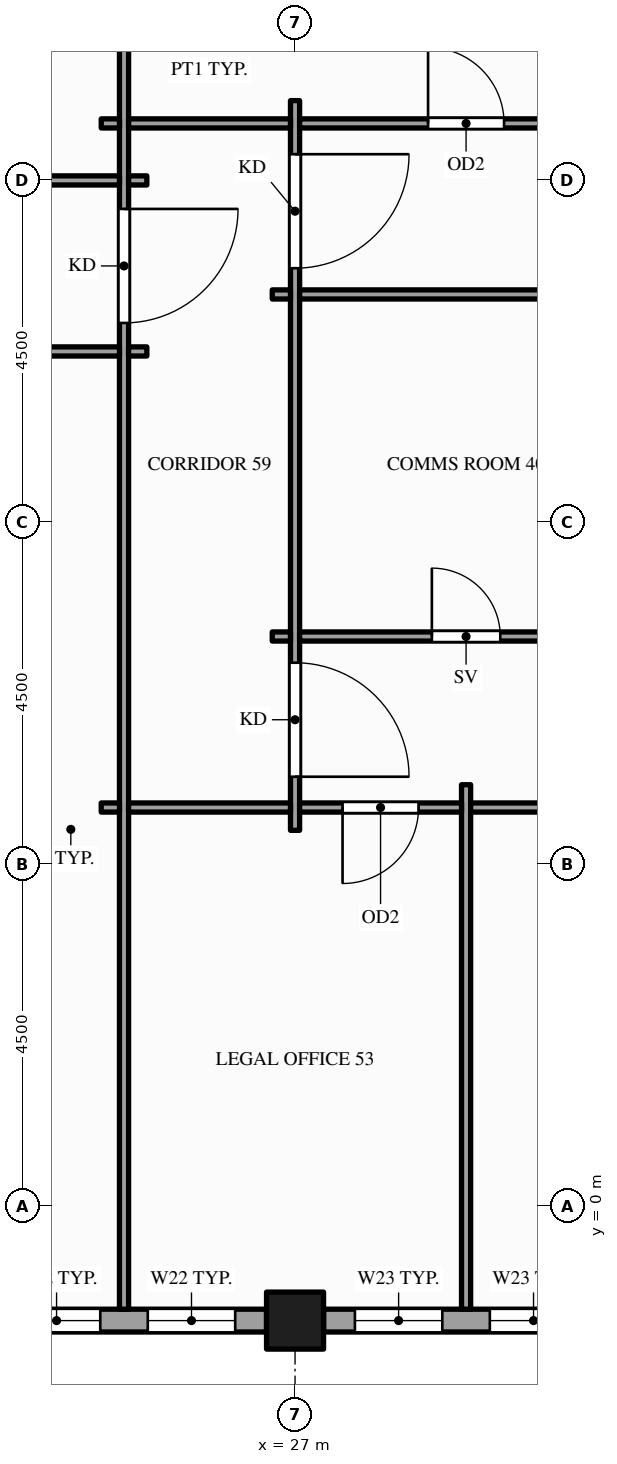
"""IFC4 building model, lengths in metres.
Left out: names, types, materials, properties, quantities, classifications, styles, units other than length and angle.
Written with IfcOpenShell. Run it as: python <this file> out.ifc"""

import sys

from ifc_helpers import new_model, si_unit, direction, frame, frame_2d, origin, origin_2d, place, context, subcontext, project, spatial, rectangle, hollow_rectangle, extrude, element, fill, save


model = new_model("IFC4")
c1 = context("Model", 3, precision=1e-05, world=origin(), true_north=direction((0.0, 1.0)))
c2 = subcontext(c1, "Body", "Model", "MODEL_VIEW")
j1 = project(units=[si_unit("LENGTHUNIT", "METRE"), si_unit("PLANEANGLEUNIT", "RADIAN")], contexts=[c1])
p1 = place(None, origin())
s1 = spatial("IfcSite", under=j1, at=p1, CompositionType="ELEMENT")
p2 = place(p1, origin())
s2 = spatial("IfcBuilding", under=s1, at=p2, CompositionType="ELEMENT")
p3 = place(p2, frame((0.0, 0.0, 235.0)))
s3 = spatial("IfcBuildingStorey", under=s2, at=p3, CompositionType="ELEMENT", Elevation=235.0)
p4 = place(p3, frame((27.0, -1.5, -0.15), z_axis=(0.0, 0.0, 1.0), x_axis=(1.0, 0.0, 0.0)))
e1 = element("IfcColumn", 1, at=p4, inside=s3, PredefinedType="COLUMN", context=c2, shape_type="SweptSolid", body=[
    extrude(hollow_rectangle(XDim=0.75, YDim=0.75, WallThickness=0.036, at=origin_2d()), origin(), (0.0, 0.0, 1.0), 4.0),
])
p5 = place(p3, frame((22.875, -1.5, 0.0), z_axis=(0.0, 0.0, 1.0), x_axis=(1.0, 0.0, 0.0)))
e2 = element("IfcWall", 2, at=p5, inside=s3, PredefinedType="STANDARD", context=c2, shape_type="SweptSolid", body=[
    extrude(rectangle(XDim=3.75, YDim=0.3, at=frame_2d((1.875, 0.0))), origin(), (0.0, 0.0, 1.0), 2.76),
])
p6 = place(p5, frame((0.413, 0.0, 0.9)))
e3 = element("IfcOpeningElement", 3, at=p6, cuts=e2, PredefinedType="OPENING", context=c2, shape_type="SweptSolid", body=[
    extrude(rectangle(XDim=1.15, YDim=1.5, at=frame_2d((0.575, 0.75))), frame((0.0, 0.16, 0.0), z_axis=(0.0, -1.0, 0.0), x_axis=(1.0, 0.0, 0.0)), (0.0, 0.0, 1.0), 0.32),
])
p7 = place(p5, frame((2.188, 0.0, 0.9)))
e4 = element("IfcOpeningElement", 4, at=p7, cuts=e2, PredefinedType="OPENING", context=c2, shape_type="SweptSolid", body=[
    extrude(rectangle(XDim=1.15, YDim=1.5, at=frame_2d((0.575, 0.75))), frame((0.0, 0.16, 0.0), z_axis=(0.0, -1.0, 0.0), x_axis=(1.0, 0.0, 0.0)), (0.0, 0.0, 1.0), 0.32),
])
p8 = place(p3, frame((27.375, -1.5, 0.0), z_axis=(0.0, 0.0, 1.0), x_axis=(1.0, 0.0, 0.0)))
e5 = element("IfcWall", 5, at=p8, inside=s3, PredefinedType="STANDARD", context=c2, shape_type="SweptSolid", body=[
    extrude(rectangle(XDim=3.75, YDim=0.3, at=frame_2d((1.875, 0.0))), origin(), (0.0, 0.0, 1.0), 2.87),
])
p9 = place(p8, frame((0.413, 0.0, 0.9)))
e6 = element("IfcOpeningElement", 6, at=p9, cuts=e5, PredefinedType="OPENING", context=c2, shape_type="SweptSolid", body=[
    extrude(rectangle(XDim=1.15, YDim=1.75, at=frame_2d((0.575, 0.875))), frame((0.0, 0.16, 0.0), z_axis=(0.0, -1.0, 0.0), x_axis=(1.0, 0.0, 0.0)), (0.0, 0.0, 1.0), 0.32),
])
p10 = place(p8, frame((2.188, 0.0, 0.9)))
e7 = element("IfcOpeningElement", 7, at=p10, cuts=e5, PredefinedType="OPENING", context=c2, shape_type="SweptSolid", body=[
    extrude(rectangle(XDim=1.15, YDim=1.75, at=frame_2d((0.575, 0.875))), frame((0.0, 0.16, 0.0), z_axis=(0.0, -1.0, 0.0), x_axis=(1.0, 0.0, 0.0)), (0.0, 0.0, 1.0), 0.32),
])
p11 = place(p3, frame((24.75, -1.35, 0.0), z_axis=(0.0, 0.0, 1.0), x_axis=(0.0, 1.0, 0.0)))
e8 = element("IfcWall", 8, at=p11, inside=s3, PredefinedType="PARTITIONING", context=c2, shape_type="SweptSolid", body=[
    extrude(rectangle(XDim=24.101, YDim=0.12, at=frame_2d((12.05, 0.0))), origin(), (0.0, 0.0, 1.0), 2.76),
])
p12 = place(p11, frame((12.975, 0.0, 0.0)))
e9 = element("IfcOpeningElement", 9, at=p12, cuts=e8, PredefinedType="OPENING", context=c2, shape_type="SweptSolid", body=[
    extrude(rectangle(XDim=1.5, YDim=2.1, at=frame_2d((0.75, 1.05))), frame((0.0, 0.07, 0.0), z_axis=(0.0, -1.0, 0.0), x_axis=(1.0, 0.0, 0.0)), (0.0, 0.0, 1.0), 0.14),
])
p13 = place(p3, frame((27.0, 4.95, 0.0), z_axis=(0.0, 0.0, 1.0), x_axis=(0.0, 1.0, 0.0)))
e10 = element("IfcWall", 10, at=p13, inside=s3, PredefinedType="PARTITIONING", context=c2, shape_type="SweptSolid", body=[
    extrude(rectangle(XDim=9.6, YDim=0.12, at=frame_2d((4.8, 0.0))), origin(), (0.0, 0.0, 1.0), 2.87),
])
p14 = place(p13, frame((0.705, 0.0, 0.0)))
e11 = element("IfcOpeningElement", 11, at=p14, cuts=e10, PredefinedType="OPENING", context=c2, shape_type="SweptSolid", body=[
    extrude(rectangle(XDim=1.5, YDim=2.1, at=frame_2d((0.75, 1.05))), frame((0.0, 0.07, 0.0), z_axis=(0.0, -1.0, 0.0), x_axis=(1.0, 0.0, 0.0)), (0.0, 0.0, 1.0), 0.14),
])
p15 = place(p13, frame((7.395, 0.0, 0.0)))
e12 = element("IfcOpeningElement", 12, at=p15, cuts=e10, PredefinedType="OPENING", context=c2, shape_type="SweptSolid", body=[
    extrude(rectangle(XDim=1.5, YDim=2.1, at=frame_2d((0.75, 1.05))), frame((0.0, 0.07, 0.0), z_axis=(0.0, -1.0, 0.0), x_axis=(1.0, 0.0, 0.0)), (0.0, 0.0, 1.0), 0.14),
])
p16 = place(p3, frame((29.25, -1.35, 0.0), z_axis=(0.0, 0.0, 1.0), x_axis=(0.0, 1.0, 0.0)))
e13 = element("IfcWall", 13, at=p16, inside=s3, PredefinedType="PARTITIONING", context=c2, shape_type="SweptSolid", body=[
    extrude(rectangle(XDim=6.9, YDim=0.12, at=frame_2d((3.45, 0.0))), origin(), (0.0, 0.0, 1.0), 2.87),
])
p17 = place(p3, frame((24.45, 5.25, 0.0), z_axis=(0.0, 0.0, 1.0), x_axis=(1.0, 0.0, 0.0)))
e14 = element("IfcWall", 14, at=p17, inside=s3, PredefinedType="PARTITIONING", context=c2, shape_type="SweptSolid", body=[
    extrude(rectangle(XDim=0.24, YDim=0.12, at=frame_2d((0.12, 0.0))), origin(), (0.0, 0.0, 1.0), 2.76),
])
p18 = place(p3, frame((24.81, 5.25, 0.0), z_axis=(0.0, 0.0, 1.0), x_axis=(1.0, 0.0, 0.0)))
e15 = element("IfcWall", 15, at=p18, inside=s3, PredefinedType="PARTITIONING", context=c2, shape_type="SweptSolid", body=[
    extrude(rectangle(XDim=2.13, YDim=0.12, at=frame_2d((1.065, 0.0))), origin(), (0.0, 0.0, 1.0), 2.76),
])
p19 = place(p3, frame((27.06, 5.25, 0.0), z_axis=(0.0, 0.0, 1.0), x_axis=(1.0, 0.0, 0.0)))
e16 = element("IfcWall", 16, at=p19, inside=s3, PredefinedType="PARTITIONING", context=c2, shape_type="SweptSolid", body=[
    extrude(rectangle(XDim=2.13, YDim=0.12, at=frame_2d((1.065, 0.0))), origin(), (0.0, 0.0, 1.0), 2.87),
])
p20 = place(p19, frame((0.565, 0.0, 0.0)))
e17 = element("IfcOpeningElement", 17, at=p20, cuts=e16, PredefinedType="OPENING", context=c2, shape_type="SweptSolid", body=[
    extrude(rectangle(XDim=1.0, YDim=2.1, at=frame_2d((0.5, 1.05))), frame((0.0, 0.07, 0.0), z_axis=(0.0, -1.0, 0.0), x_axis=(1.0, 0.0, 0.0)), (0.0, 0.0, 1.0), 0.14),
])
p21 = place(p3, frame((29.31, 5.25, 0.0), z_axis=(0.0, 0.0, 1.0), x_axis=(1.0, 0.0, 0.0)))
e18 = element("IfcWall", 18, at=p21, inside=s3, PredefinedType="PARTITIONING", context=c2, shape_type="SweptSolid", body=[
    extrude(rectangle(XDim=11.13, YDim=0.12, at=frame_2d((5.565, 0.0))), origin(), (0.0, 0.0, 1.0), 2.87),
])
p22 = place(p21, frame((4.665, 0.0, 0.0)))
e19 = element("IfcOpeningElement", 19, at=p22, cuts=e18, PredefinedType="OPENING", context=c2, shape_type="SweptSolid", body=[
    extrude(rectangle(XDim=1.8, YDim=2.1, at=frame_2d((0.9, 1.05))), frame((0.0, 0.07, 0.0), z_axis=(0.0, -1.0, 0.0), x_axis=(1.0, 0.0, 0.0)), (0.0, 0.0, 1.0), 0.14),
])
p23 = place(p3, frame((26.7, 7.5, 0.0), z_axis=(0.0, 0.0, 1.0), x_axis=(1.0, 0.0, 0.0)))
e20 = element("IfcWall", 20, at=p23, inside=s3, PredefinedType="PARTITIONING", context=c2, shape_type="SweptSolid", body=[
    extrude(rectangle(XDim=0.24, YDim=0.12, at=frame_2d((0.12, 0.0))), origin(), (0.0, 0.0, 1.0), 2.87),
])
p24 = place(p3, frame((27.06, 7.5, 0.0), z_axis=(0.0, 0.0, 1.0), x_axis=(1.0, 0.0, 0.0)))
e21 = element("IfcWall", 21, at=p24, inside=s3, PredefinedType="PARTITIONING", context=c2, shape_type="SweptSolid", body=[
    extrude(rectangle(XDim=4.38, YDim=0.12, at=frame_2d((2.19, 0.0))), origin(), (0.0, 0.0, 1.0), 2.87),
])
p25 = place(p24, frame((1.74, 0.0, 0.0)))
e22 = element("IfcOpeningElement", 22, at=p25, cuts=e21, PredefinedType="OPENING", context=c2, shape_type="SweptSolid", body=[
    extrude(rectangle(XDim=0.9, YDim=2.1, at=frame_2d((0.45, 1.05))), frame((0.0, 0.07, 0.0), z_axis=(0.0, -1.0, 0.0), x_axis=(1.0, 0.0, 0.0)), (0.0, 0.0, 1.0), 0.14),
])
p26 = place(p3, frame((20.31, 11.25, 0.0), z_axis=(0.0, 0.0, 1.0), x_axis=(1.0, 0.0, 0.0)))
e23 = element("IfcWall", 23, at=p26, inside=s3, PredefinedType="PARTITIONING", context=c2, shape_type="SweptSolid", body=[
    extrude(rectangle(XDim=4.38, YDim=0.12, at=frame_2d((2.19, 0.0))), origin(), (0.0, 0.0, 1.0), 2.76),
])
p27 = place(p26, frame((1.69, 0.0, 0.0)))
e24 = element("IfcOpeningElement", 24, at=p27, cuts=e23, PredefinedType="OPENING", context=c2, shape_type="SweptSolid", body=[
    extrude(rectangle(XDim=1.0, YDim=2.1, at=frame_2d((0.5, 1.05))), frame((0.0, 0.07, 0.0), z_axis=(0.0, -1.0, 0.0), x_axis=(1.0, 0.0, 0.0)), (0.0, 0.0, 1.0), 0.14),
])
p28 = place(p3, frame((24.81, 11.25, 0.0), z_axis=(0.0, 0.0, 1.0), x_axis=(1.0, 0.0, 0.0)))
e25 = element("IfcWall", 25, at=p28, inside=s3, PredefinedType="PARTITIONING", context=c2, shape_type="SweptSolid", body=[
    extrude(rectangle(XDim=0.24, YDim=0.12, at=frame_2d((0.12, 0.0))), origin(), (0.0, 0.0, 1.0), 2.76),
])
p29 = place(p3, frame((26.7, 12.0, 0.0), z_axis=(0.0, 0.0, 1.0), x_axis=(1.0, 0.0, 0.0)))
e26 = element("IfcWall", 26, at=p29, inside=s3, PredefinedType="PARTITIONING", context=c2, shape_type="SweptSolid", body=[
    extrude(rectangle(XDim=0.24, YDim=0.12, at=frame_2d((0.12, 0.0))), origin(), (0.0, 0.0, 1.0), 2.87),
])
p30 = place(p3, frame((27.06, 12.0, 0.0), z_axis=(0.0, 0.0, 1.0), x_axis=(1.0, 0.0, 0.0)))
e27 = element("IfcWall", 27, at=p30, inside=s3, PredefinedType="PARTITIONING", context=c2, shape_type="SweptSolid", body=[
    extrude(rectangle(XDim=4.38, YDim=0.12, at=frame_2d((2.19, 0.0))), origin(), (0.0, 0.0, 1.0), 2.87),
])
p31 = place(p3, frame((11.31, 13.5, 0.0), z_axis=(0.0, 0.0, 1.0), x_axis=(1.0, 0.0, 0.0)))
e28 = element("IfcWall", 28, at=p31, inside=s3, PredefinedType="PARTITIONING", context=c2, shape_type="SweptSolid", body=[
    extrude(rectangle(XDim=13.38, YDim=0.12, at=frame_2d((6.69, 0.0))), origin(), (0.0, 0.0, 1.0), 2.76),
])
p32 = place(p31, frame((3.54, 0.0, 0.0)))
e29 = element("IfcOpeningElement", 29, at=p32, cuts=e28, PredefinedType="OPENING", context=c2, shape_type="SweptSolid", body=[
    extrude(rectangle(XDim=1.8, YDim=2.1, at=frame_2d((0.9, 1.05))), frame((0.0, 0.07, 0.0), z_axis=(0.0, -1.0, 0.0), x_axis=(1.0, 0.0, 0.0)), (0.0, 0.0, 1.0), 0.14),
])
for number, where, z_axis, x_axis in (
    (30, (24.81, 13.5, 0.0), (0.0, 0.0, 1.0), (1.0, 0.0, 0.0)),
    (31, (24.45, 14.25, 0.0), (0.0, 0.0, 1.0), (1.0, 0.0, 0.0)),
):
    element("IfcWall", number, at=place(p3, frame(where, z_axis=z_axis, x_axis=x_axis)), inside=s3, PredefinedType="PARTITIONING", context=c2, shape_type="SweptSolid", body=[
        extrude(rectangle(XDim=0.24, YDim=0.12, at=frame_2d((0.12, 0.0))), origin(), (0.0, 0.0, 1.0), 2.76),
    ])
p33 = place(p3, frame((24.81, 14.25, 0.0), z_axis=(0.0, 0.0, 1.0), x_axis=(1.0, 0.0, 0.0)))
e32 = element("IfcWall", 32, at=p33, inside=s3, PredefinedType="PARTITIONING", context=c2, shape_type="SweptSolid", body=[
    extrude(rectangle(XDim=2.13, YDim=0.12, at=frame_2d((1.065, 0.0))), origin(), (0.0, 0.0, 1.0), 2.76),
])
p34 = place(p3, frame((27.06, 14.25, 0.0), z_axis=(0.0, 0.0, 1.0), x_axis=(1.0, 0.0, 0.0)))
e33 = element("IfcWall", 33, at=p34, inside=s3, PredefinedType="PARTITIONING", context=c2, shape_type="SweptSolid", body=[
    extrude(rectangle(XDim=4.38, YDim=0.12, at=frame_2d((2.19, 0.0))), origin(), (0.0, 0.0, 1.0), 2.87),
])
p35 = place(p34, frame((1.69, 0.0, 0.0)))
e34 = element("IfcOpeningElement", 34, at=p35, cuts=e33, PredefinedType="OPENING", context=c2, shape_type="SweptSolid", body=[
    extrude(rectangle(XDim=1.0, YDim=2.1, at=frame_2d((0.5, 1.05))), frame((0.0, 0.07, 0.0), z_axis=(0.0, -1.0, 0.0), x_axis=(1.0, 0.0, 0.0)), (0.0, 0.0, 1.0), 0.14),
])
p36 = place(p6, origin())
e35 = element("IfcWindow", 35, at=p36, inside=s3, PartitioningType="SINGLE_PANEL", PredefinedType="WINDOW", context=c2, shape_type="SweptSolid", body=[
    extrude(rectangle(XDim=1.15, YDim=1.5, at=frame_2d((0.575, 0.75))), frame((0.0, 0.03, 0.0), z_axis=(0.0, -1.0, 0.0), x_axis=(1.0, 0.0, 0.0)), (0.0, 0.0, 1.0), 0.06),
])
fill(e3, e35)
p37 = place(p7, origin())
e36 = element("IfcWindow", 36, at=p37, inside=s3, PartitioningType="SINGLE_PANEL", PredefinedType="WINDOW", context=c2, shape_type="SweptSolid", body=[
    extrude(rectangle(XDim=1.15, YDim=1.5, at=frame_2d((0.575, 0.75))), frame((0.0, 0.03, 0.0), z_axis=(0.0, -1.0, 0.0), x_axis=(1.0, 0.0, 0.0)), (0.0, 0.0, 1.0), 0.06),
])
fill(e4, e36)
p38 = place(p9, origin())
e37 = element("IfcWindow", 37, at=p38, inside=s3, PartitioningType="SINGLE_PANEL", PredefinedType="WINDOW", context=c2, shape_type="SweptSolid", body=[
    extrude(rectangle(XDim=1.15, YDim=1.75, at=frame_2d((0.575, 0.875))), frame((0.0, 0.03, 0.0), z_axis=(0.0, -1.0, 0.0), x_axis=(1.0, 0.0, 0.0)), (0.0, 0.0, 1.0), 0.06),
])
fill(e6, e37)
p39 = place(p10, origin())
e38 = element("IfcWindow", 38, at=p39, inside=s3, PartitioningType="SINGLE_PANEL", PredefinedType="WINDOW", context=c2, shape_type="SweptSolid", body=[
    extrude(rectangle(XDim=1.15, YDim=1.75, at=frame_2d((0.575, 0.875))), frame((0.0, 0.03, 0.0), z_axis=(0.0, -1.0, 0.0), x_axis=(1.0, 0.0, 0.0)), (0.0, 0.0, 1.0), 0.06),
])
fill(e7, e38)
p40 = place(p12, origin())
e39 = element("IfcDoor", 39, at=p40, inside=s3, OperationType="SINGLE_SWING_RIGHT", PredefinedType="DOOR", context=c2, shape_type="SweptSolid", body=[
    extrude(rectangle(XDim=1.5, YDim=2.1, at=frame_2d((0.75, 1.05))), frame((0.0, 0.025, 0.0), z_axis=(0.0, -1.0, 0.0), x_axis=(1.0, 0.0, 0.0)), (0.0, 0.0, 1.0), 0.05),
])
fill(e9, e39)
p41 = place(p14, origin())
e40 = element("IfcDoor", 40, at=p41, inside=s3, OperationType="SINGLE_SWING_LEFT", PredefinedType="DOOR", context=c2, shape_type="SweptSolid", body=[
    extrude(rectangle(XDim=1.5, YDim=2.1, at=frame_2d((0.75, 1.05))), frame((0.0, 0.025, 0.0), z_axis=(0.0, -1.0, 0.0), x_axis=(1.0, 0.0, 0.0)), (0.0, 0.0, 1.0), 0.05),
])
fill(e11, e40)
p42 = place(p15, origin())
e41 = element("IfcDoor", 41, at=p42, inside=s3, OperationType="SINGLE_SWING_RIGHT", PredefinedType="DOOR", context=c2, shape_type="SweptSolid", body=[
    extrude(rectangle(XDim=1.5, YDim=2.1, at=frame_2d((0.75, 1.05))), frame((0.0, 0.025, 0.0), z_axis=(0.0, -1.0, 0.0), x_axis=(1.0, 0.0, 0.0)), (0.0, 0.0, 1.0), 0.05),
])
fill(e12, e41)
p43 = place(p25, origin())
e42 = element("IfcDoor", 42, at=p43, inside=s3, OperationType="SINGLE_SWING_LEFT", PredefinedType="DOOR", context=c2, shape_type="SweptSolid", body=[
    extrude(rectangle(XDim=0.9, YDim=2.1, at=frame_2d((0.45, 1.05))), frame((0.0, 0.025, 0.0), z_axis=(0.0, -1.0, 0.0), x_axis=(1.0, 0.0, 0.0)), (0.0, 0.0, 1.0), 0.05),
])
fill(e22, e42)
p44 = place(p20, origin())
e43 = element("IfcDoor", 43, at=p44, inside=s3, OperationType="SINGLE_SWING_LEFT", PredefinedType="DOOR", context=c2, shape_type="SweptSolid", body=[
    extrude(rectangle(XDim=1.0, YDim=2.1, at=frame_2d((0.5, 1.05))), frame((0.0, 0.025, 0.0), z_axis=(0.0, -1.0, 0.0), x_axis=(1.0, 0.0, 0.0)), (0.0, 0.0, 1.0), 0.05),
])
fill(e17, e43)
p45 = place(p35, origin())
e44 = element("IfcDoor", 44, at=p45, inside=s3, OperationType="SINGLE_SWING_LEFT", PredefinedType="DOOR", context=c2, shape_type="SweptSolid", body=[
    extrude(rectangle(XDim=1.0, YDim=2.1, at=frame_2d((0.5, 1.05))), frame((0.0, 0.025, 0.0), z_axis=(0.0, -1.0, 0.0), x_axis=(1.0, 0.0, 0.0)), (0.0, 0.0, 1.0), 0.05),
])
fill(e34, e44)
save(model, sys.argv[1])
